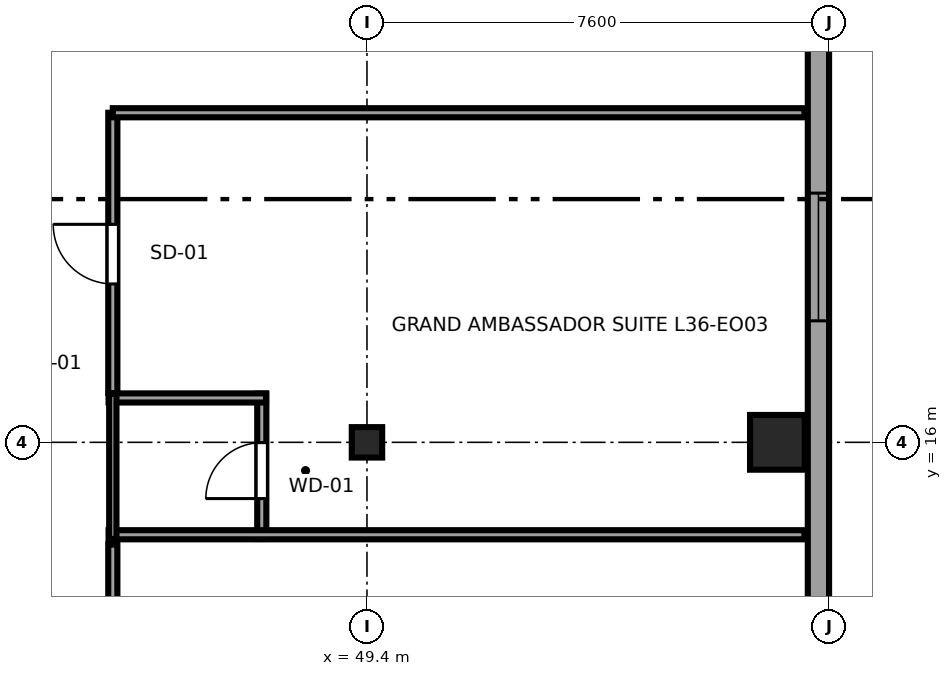
"""IFC4 building model, lengths in metres.
Left out: names, types, materials, properties, quantities, classifications, styles, units other than length and angle.
Written with IfcOpenShell. Run it as: python <this file> out.ifc"""

import sys

from ifc_helpers import new_model, si_unit, direction, frame, frame_2d, origin, origin_2d, place, context, subcontext, project, spatial, rectangle, i_section, extrude, source, transform, mapped, element, fill, save


model = new_model("IFC4")
c1 = context("Model", 3, precision=1e-05, world=origin(), true_north=direction((0.0, 1.0)))
c2 = subcontext(c1, "Body", "Model", "MODEL_VIEW")
j1 = project(units=[si_unit("LENGTHUNIT", "METRE"), si_unit("PLANEANGLEUNIT", "RADIAN")], contexts=[c1])
p1 = place(None, origin())
s1 = spatial("IfcSite", under=j1, at=p1, CompositionType="ELEMENT")
p2 = place(p1, origin())
s2 = spatial("IfcBuilding", under=s1, at=p2, CompositionType="ELEMENT")
p3 = place(p2, frame((0.0, 0.0, 139.95)))
s3 = spatial("IfcBuildingStorey", under=s2, at=p3, CompositionType="ELEMENT", Elevation=139.95)
m1 = source(origin(), c2, "Body", "SweptSolid", [
    extrude(i_section(OverallWidth=0.5, OverallDepth=0.5, WebThickness=0.022, FlangeThickness=0.034, at=origin_2d()), origin(), (0.0, 0.0, 1.0), 3.55),
])
p4 = place(p3, frame((49.4, 16.0, 0.0), z_axis=(0.0, 0.0, 1.0), x_axis=(1.0, 0.0, 0.0)))
e1 = element("IfcColumn", 1, at=p4, inside=s3, PredefinedType="COLUMN", context=c2, shape_type="MappedRepresentation", body=[
    mapped(m1, transform((0.0, 0.0, 0.0), x_axis=(1.0, 0.0, 0.0), y_axis=(0.0, 1.0, 0.0), z_axis=(0.0, 0.0, 1.0), scale=1.0)),
])
m2 = source(origin(), c2, "Body", "SweptSolid", [
    extrude(rectangle(XDim=0.9, YDim=0.9, at=origin_2d()), origin(), (0.0, 0.0, 1.0), 3.55),
])
p5 = place(p3, frame((56.15, 16.0, 0.0), z_axis=(0.0, 0.0, 1.0), x_axis=(1.0, 0.0, 0.0)))
e2 = element("IfcColumn", 2, at=p5, inside=s3, PredefinedType="COLUMN", context=c2, shape_type="MappedRepresentation", body=[
    mapped(m2, transform((0.0, 0.0, 0.0), x_axis=(1.0, 0.0, 0.0), y_axis=(0.0, 1.0, 0.0), z_axis=(0.0, 0.0, 1.0), scale=1.0)),
])
p6 = place(p3, frame((56.825, 4.617, 0.0), z_axis=(0.0, 0.0, 1.0), x_axis=(0.0, 1.0, 0.0)))
e3 = element("IfcWall", 3, at=p6, inside=s3, PredefinedType="SOLIDWALL", context=c2, shape_type="SweptSolid", body=[
    extrude(rectangle(XDim=36.766, YDim=0.35, at=frame_2d((18.383, 0.0))), origin(), (0.0, 0.0, 1.0), 3.37),
])
p7 = place(p6, frame((5.478, 0.0, 0.68)))
e4 = element("IfcOpeningElement", 4, at=p7, cuts=e3, PredefinedType="OPENING", context=c2, shape_type="SweptSolid", body=[
    extrude(rectangle(XDim=2.1, YDim=1.9, at=frame_2d((1.05, 0.95))), frame((0.0, 0.185, 0.0), z_axis=(0.0, -1.0, 0.0), x_axis=(1.0, 0.0, 0.0)), (0.0, 0.0, 1.0), 0.37),
])
p8 = place(p6, frame((13.381, 0.0, 0.68)))
e5 = element("IfcOpeningElement", 5, at=p8, cuts=e3, PredefinedType="OPENING", context=c2, shape_type="SweptSolid", body=[
    extrude(rectangle(XDim=2.1, YDim=1.9, at=frame_2d((1.05, 0.95))), frame((0.0, 0.185, 0.0), z_axis=(0.0, -1.0, 0.0), x_axis=(1.0, 0.0, 0.0)), (0.0, 0.0, 1.0), 0.37),
])
p9 = place(p6, frame((21.285, 0.0, 0.68)))
e6 = element("IfcOpeningElement", 6, at=p9, cuts=e3, PredefinedType="OPENING", context=c2, shape_type="SweptSolid", body=[
    extrude(rectangle(XDim=2.1, YDim=1.9, at=frame_2d((1.05, 0.95))), frame((0.0, 0.185, 0.0), z_axis=(0.0, -1.0, 0.0), x_axis=(1.0, 0.0, 0.0)), (0.0, 0.0, 1.0), 0.37),
])
p10 = place(p6, frame((30.238, 0.0, 0.68)))
e7 = element("IfcOpeningElement", 7, at=p10, cuts=e3, PredefinedType="OPENING", context=c2, shape_type="SweptSolid", body=[
    extrude(rectangle(XDim=2.1, YDim=1.9, at=frame_2d((1.05, 0.95))), frame((0.0, 0.185, 0.0), z_axis=(0.0, -1.0, 0.0), x_axis=(1.0, 0.0, 0.0)), (0.0, 0.0, 1.0), 0.37),
])
p11 = place(p3, frame((47.67, 14.41, 0.0), z_axis=(0.0, 0.0, 1.0), x_axis=(0.0, 1.0, 0.0)))
e8 = element("IfcWall", 8, at=p11, inside=s3, PredefinedType="PARTITIONING", context=c2, shape_type="SweptSolid", body=[
    extrude(rectangle(XDim=2.39, YDim=0.15, at=frame_2d((1.195, 0.0))), origin(), (0.0, 0.0, 1.0), 3.37),
])
p12 = place(p11, frame((0.665, 0.0, 0.0)))
e9 = element("IfcOpeningElement", 9, at=p12, cuts=e8, PredefinedType="OPENING", context=c2, shape_type="SweptSolid", body=[
    extrude(rectangle(XDim=0.92, YDim=2.01, at=frame_2d((0.46, 1.005))), frame((0.0, 0.085, 0.0), z_axis=(0.0, -1.0, 0.0), x_axis=(1.0, 0.0, 0.0)), (0.0, 0.0, 1.0), 0.17),
])
p13 = place(p3, frame((45.15, 14.48, 0.0), z_axis=(0.0, 0.0, 1.0), x_axis=(1.0, 0.0, 0.0)))
e10 = element("IfcWall", 10, at=p13, inside=s3, PredefinedType="PARTITIONING", context=c2, shape_type="SweptSolid", body=[
    extrude(rectangle(XDim=11.445, YDim=0.15, at=frame_2d((5.723, 0.0))), origin(), (0.0, 0.0, 1.0), 3.37),
])
p14 = place(p3, frame((45.15, 16.73, 0.0), z_axis=(0.0, 0.0, 1.0), x_axis=(1.0, 0.0, 0.0)))
e11 = element("IfcWall", 11, at=p14, inside=s3, PredefinedType="PARTITIONING", context=c2, shape_type="SweptSolid", body=[
    extrude(rectangle(XDim=2.59, YDim=0.15, at=frame_2d((1.295, 0.0))), origin(), (0.0, 0.0, 1.0), 3.37),
])
p15 = place(p3, frame((45.22, 14.41, 0.0), z_axis=(0.0, 0.0, 1.0), x_axis=(0.0, 1.0, 0.0)))
e12 = element("IfcWall", 12, at=p15, inside=s3, PredefinedType="PLUMBINGWALL", context=c2, shape_type="SweptSolid", body=[
    extrude(rectangle(XDim=2.39, YDim=0.12, at=frame_2d((1.195, 0.0))), origin(), (0.0, 0.0, 1.0), 3.37),
])
p16 = place(p3, frame((45.22, 9.61, 0.0), z_axis=(0.0, 0.0, 1.0), x_axis=(0.0, 1.0, 0.0)))
e13 = element("IfcWall", 13, at=p16, inside=s3, PredefinedType="PARTITIONING", context=c2, shape_type="SweptSolid", body=[
    extrude(rectangle(XDim=4.71, YDim=0.15, at=frame_2d((2.355, 0.0))), origin(), (0.0, 0.0, 1.0), 3.37),
])
p17 = place(p16, frame((1.845, 0.0, 0.0)))
e14 = element("IfcOpeningElement", 14, at=p17, cuts=e13, PredefinedType="OPENING", context=c2, shape_type="SweptSolid", body=[
    extrude(rectangle(XDim=0.98, YDim=2.12, at=frame_2d((0.49, 1.06))), frame((0.0, 0.085, 0.0), z_axis=(0.0, -1.0, 0.0), x_axis=(1.0, 0.0, 0.0)), (0.0, 0.0, 1.0), 0.17),
])
p18 = place(p3, frame((45.22, 16.81, 0.0), z_axis=(0.0, 0.0, 1.0), x_axis=(0.0, 1.0, 0.0)))
e15 = element("IfcWall", 15, at=p18, inside=s3, PredefinedType="PARTITIONING", context=c2, shape_type="SweptSolid", body=[
    extrude(rectangle(XDim=4.61, YDim=0.15, at=frame_2d((2.305, 0.0))), origin(), (0.0, 0.0, 1.0), 3.37),
])
p19 = place(p18, frame((1.795, 0.0, 0.0)))
e16 = element("IfcOpeningElement", 16, at=p19, cuts=e15, PredefinedType="OPENING", context=c2, shape_type="SweptSolid", body=[
    extrude(rectangle(XDim=0.98, YDim=2.12, at=frame_2d((0.49, 1.06))), frame((0.0, 0.085, 0.0), z_axis=(0.0, -1.0, 0.0), x_axis=(1.0, 0.0, 0.0)), (0.0, 0.0, 1.0), 0.17),
])
p20 = place(p3, frame((45.22, 21.42, 0.0), z_axis=(0.0, 0.0, 1.0), x_axis=(1.0, 0.0, 0.0)))
e17 = element("IfcWall", 17, at=p20, inside=s3, PredefinedType="PARTITIONING", context=c2, shape_type="SweptSolid", body=[
    extrude(rectangle(XDim=11.375, YDim=0.15, at=frame_2d((5.688, 0.0))), origin(), (0.0, 0.0, 1.0), 3.37),
])
m3 = source(origin(), c2, "Body", "SweptSolid", [
    extrude(rectangle(XDim=2.1, YDim=1.9, at=frame_2d((1.05, 0.95))), frame((0.0, 0.09, 0.0), z_axis=(0.0, -1.0, 0.0), x_axis=(1.0, 0.0, 0.0)), (0.0, 0.0, 1.0), 0.06),
])
p21 = place(p8, origin())
e18 = element("IfcWindow", 18, at=p21, inside=s3, PartitioningType="TRIPLE_PANEL_HORIZONTAL", PredefinedType="WINDOW", context=c2, shape_type="MappedRepresentation", body=[
    mapped(m3, transform((0.0, 0.0, 0.0), x_axis=(1.0, 0.0, 0.0), y_axis=(0.0, 1.0, 0.0), z_axis=(0.0, 0.0, 1.0), scale=1.0)),
])
fill(e5, e18)
m4 = source(origin(), c2, "Body", "SweptSolid", [
    extrude(rectangle(XDim=0.92, YDim=2.01, at=frame_2d((0.46, 1.005))), frame((0.0, 0.025, 0.0), z_axis=(0.0, -1.0, 0.0), x_axis=(1.0, 0.0, 0.0)), (0.0, 0.0, 1.0), 0.05),
])
p22 = place(p12, origin())
e19 = element("IfcDoor", 19, at=p22, inside=s3, OperationType="SINGLE_SWING_LEFT", PredefinedType="DOOR", context=c2, shape_type="MappedRepresentation", body=[
    mapped(m4, transform((0.0, 0.0, 0.0), x_axis=(1.0, 0.0, 0.0), y_axis=(0.0, 1.0, 0.0), z_axis=(0.0, 0.0, 1.0), scale=1.0)),
])
fill(e9, e19)
m5 = source(origin(), c2, "Body", "SweptSolid", [
    extrude(rectangle(XDim=0.98, YDim=2.12, at=frame_2d((0.49, 1.06))), frame((0.0, 0.025, 0.0), z_axis=(0.0, -1.0, 0.0), x_axis=(1.0, 0.0, 0.0)), (0.0, 0.0, 1.0), 0.05),
])
p23 = place(p19, origin())
e20 = element("IfcDoor", 20, at=p23, inside=s3, OperationType="SINGLE_SWING_RIGHT", PredefinedType="DOOR", context=c2, shape_type="MappedRepresentation", body=[
    mapped(m5, transform((0.0, 0.0, 0.0), x_axis=(1.0, 0.0, 0.0), y_axis=(0.0, 1.0, 0.0), z_axis=(0.0, 0.0, 1.0), scale=1.0)),
])
fill(e16, e20)
save(model, sys.argv[1])
